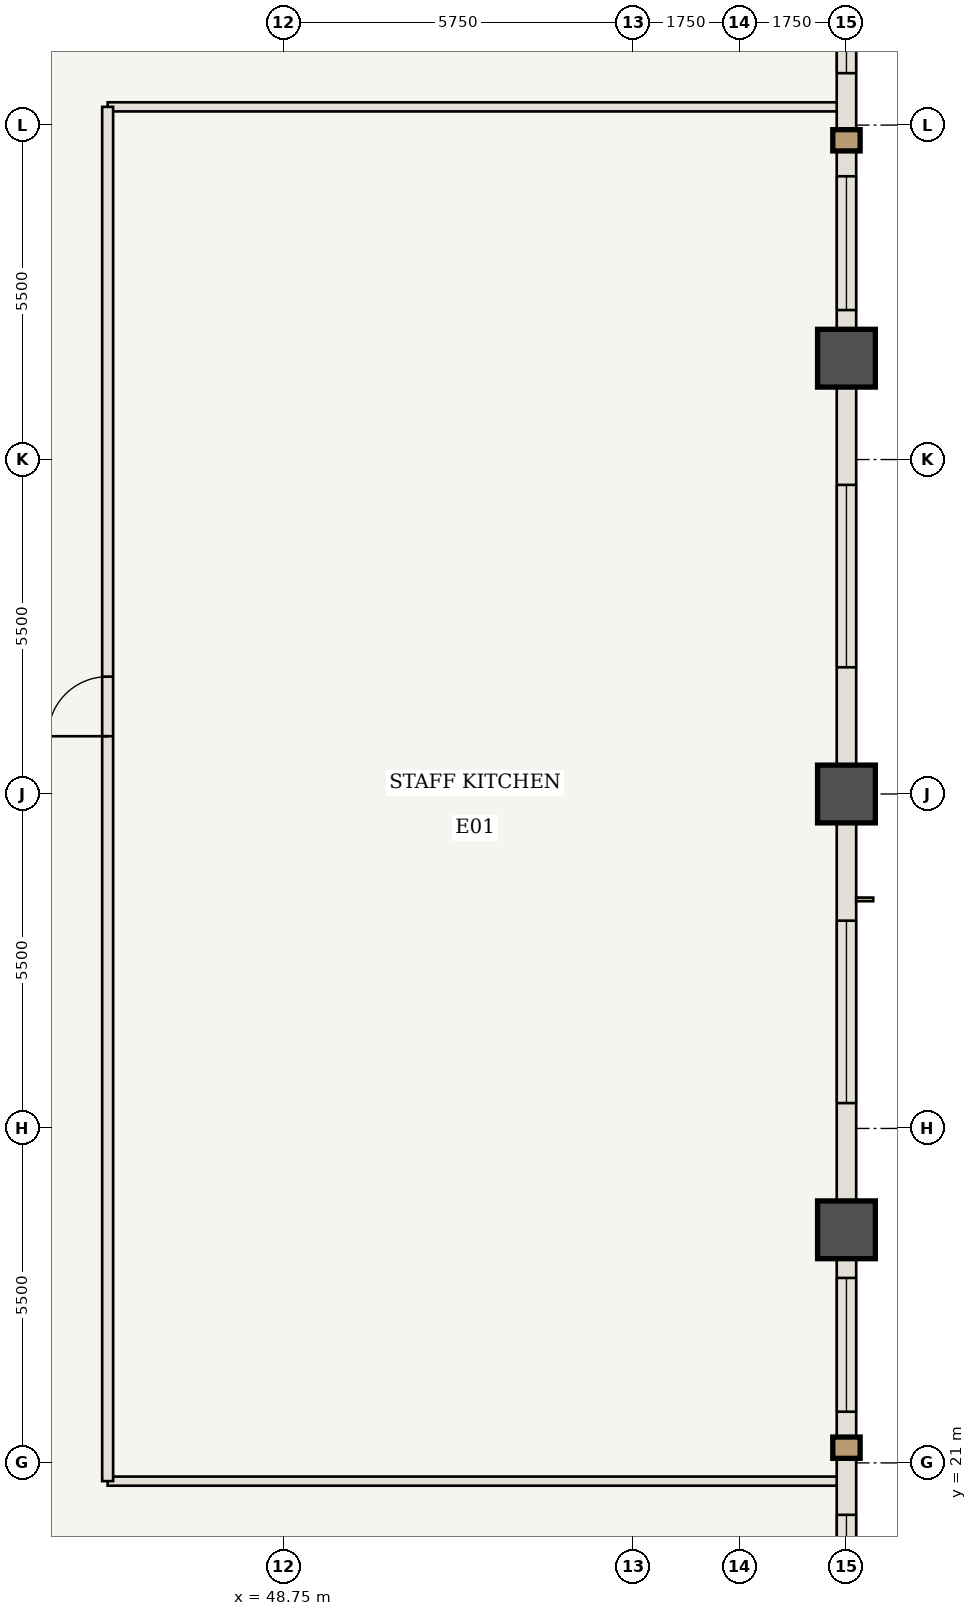
"""IFC4 building model, lengths in metres.
Left out: names, types, materials, properties, quantities, classifications, styles, units other than length and angle.
Written with IfcOpenShell. Run it as: python <this file> out.ifc"""

import sys

from ifc_helpers import new_model, si_unit, direction, frame, frame_2d, origin, origin_2d, place, context, subcontext, project, spatial, rectangle, extrude, element, fill, save


model = new_model("IFC4")
c1 = context("Model", 3, precision=1e-05, world=origin(), true_north=direction((0.0, 1.0)))
c2 = subcontext(c1, "Body", "Model", "MODEL_VIEW")
j1 = project(units=[si_unit("LENGTHUNIT", "METRE"), si_unit("PLANEANGLEUNIT", "RADIAN")], contexts=[c1])
p1 = place(None, origin())
s1 = spatial("IfcSite", under=j1, at=p1, CompositionType="ELEMENT")
p2 = place(p1, origin())
s2 = spatial("IfcBuilding", under=s1, at=p2, CompositionType="ELEMENT")
p3 = place(p2, frame((0.0, 0.0, 172.2)))
s3 = spatial("IfcBuildingStorey", under=s2, at=p3, CompositionType="ELEMENT", Elevation=172.2)
for number, where, z_axis, x_axis in (
    (1, (58.0, 24.833, 0.0), (0.0, 0.0, 1.0), (1.0, 0.0, 0.0)),
    (2, (58.0, 32.0, 0.0), (0.0, 0.0, 1.0), (1.0, 0.0, 0.0)),
    (3, (58.0, 39.167, 0.0), (0.0, 0.0, 1.0), (1.0, 0.0, 0.0)),
):
    element("IfcColumn", number, at=place(p3, frame(where, z_axis=z_axis, x_axis=x_axis)), inside=s3, PredefinedType="COLUMN", context=c2, shape_type="SweptSolid", body=[
        extrude(rectangle(XDim=0.95, YDim=0.95, at=origin_2d()), origin(), (0.0, 0.0, 1.0), 3.85),
    ])
for number, where, z_axis, x_axis in (
    (4, (45.85, 20.7, 0.0), (0.0, 0.0, 1.0), (1.0, 0.0, 0.0)),
    (5, (45.85, 43.3, 0.0), (0.0, 0.0, 1.0), (1.0, 0.0, 0.0)),
):
    element("IfcWall", number, at=place(p3, frame(where, z_axis=z_axis, x_axis=x_axis)), inside=s3, PredefinedType="STANDARD", context=c2, shape_type="SweptSolid", body=[
        extrude(rectangle(XDim=12.09, YDim=0.15, at=frame_2d((6.045, 0.0))), origin(), (0.0, 0.0, 1.0), 2.81),
    ])
p4 = place(p3, frame((45.85, 20.7, 0.0), z_axis=(0.0, 0.0, 1.0), x_axis=(0.0, 1.0, 0.0)))
e6 = element("IfcWall", 6, at=p4, inside=s3, PredefinedType="STANDARD", context=c2, shape_type="SweptSolid", body=[
    extrude(rectangle(XDim=22.6, YDim=0.18, at=frame_2d((11.3, 0.0))), origin(), (0.0, 0.0, 1.0), 3.43),
])
p5 = place(p4, frame((12.25, 0.0, 0.0)))
e7 = element("IfcOpeningElement", 7, at=p5, cuts=e6, PredefinedType="OPENING", context=c2, shape_type="SweptSolid", body=[
    extrude(rectangle(XDim=0.98, YDim=2.2, at=frame_2d((0.49, 1.1))), frame((0.0, 0.1, 0.0), z_axis=(0.0, -1.0, 0.0), x_axis=(1.0, 0.0, 0.0)), (0.0, 0.0, 1.0), 0.2),
])
p6 = place(p3, frame((58.0, 24.833, 0.0), z_axis=(0.0, 0.0, 1.0), x_axis=(0.0, -1.0, 0.0)))
e8 = element("IfcWall", 8, at=p6, inside=s3, PredefinedType="USERDEFINED", context=c2, shape_type="SweptSolid", body=[
    extrude(rectangle(XDim=7.167, YDim=0.32, at=frame_2d((3.583, 0.0))), origin(), (0.0, 0.0, 1.0), 2.63),
])
p7 = place(p6, frame((0.792, 0.0, 0.85)))
e9 = element("IfcOpeningElement", 9, at=p7, cuts=e8, PredefinedType="OPENING", context=c2, shape_type="SweptSolid", body=[
    extrude(rectangle(XDim=2.2, YDim=1.58, at=frame_2d((1.1, 0.79))), frame((0.0, 0.17, 0.0), z_axis=(0.0, -1.0, 0.0), x_axis=(1.0, 0.0, 0.0)), (0.0, 0.0, 1.0), 0.34),
])
p8 = place(p6, frame((4.688, 0.0, 0.85)))
e10 = element("IfcOpeningElement", 10, at=p8, cuts=e8, PredefinedType="OPENING", context=c2, shape_type="SweptSolid", body=[
    extrude(rectangle(XDim=1.6, YDim=1.58, at=frame_2d((0.8, 0.79))), frame((0.0, 0.17, 0.0), z_axis=(0.0, -1.0, 0.0), x_axis=(1.0, 0.0, 0.0)), (0.0, 0.0, 1.0), 0.34),
])
p9 = place(p3, frame((58.0, 32.0, 0.0), z_axis=(0.0, 0.0, 1.0), x_axis=(0.0, -1.0, 0.0)))
e11 = element("IfcWall", 11, at=p9, inside=s3, PredefinedType="USERDEFINED", context=c2, shape_type="SweptSolid", body=[
    extrude(rectangle(XDim=7.167, YDim=0.32, at=frame_2d((3.583, 0.0))), origin(), (0.0, 0.0, 1.0), 2.63),
])
p10 = place(p9, frame((2.083, 0.0, 0.85)))
e12 = element("IfcOpeningElement", 12, at=p10, cuts=e11, PredefinedType="OPENING", context=c2, shape_type="SweptSolid", body=[
    extrude(rectangle(XDim=3.0, YDim=1.58, at=frame_2d((1.5, 0.79))), frame((0.0, 0.17, 0.0), z_axis=(0.0, -1.0, 0.0), x_axis=(1.0, 0.0, 0.0)), (0.0, 0.0, 1.0), 0.34),
])
p11 = place(p3, frame((58.0, 39.167, 0.0), z_axis=(0.0, 0.0, 1.0), x_axis=(0.0, -1.0, 0.0)))
e13 = element("IfcWall", 13, at=p11, inside=s3, PredefinedType="USERDEFINED", context=c2, shape_type="SweptSolid", body=[
    extrude(rectangle(XDim=7.167, YDim=0.32, at=frame_2d((3.583, 0.0))), origin(), (0.0, 0.0, 1.0), 2.63),
])
p12 = place(p11, frame((2.083, 0.0, 0.85)))
e14 = element("IfcOpeningElement", 14, at=p12, cuts=e13, PredefinedType="OPENING", context=c2, shape_type="SweptSolid", body=[
    extrude(rectangle(XDim=3.0, YDim=1.58, at=frame_2d((1.5, 0.79))), frame((0.0, 0.17, 0.0), z_axis=(0.0, -1.0, 0.0), x_axis=(1.0, 0.0, 0.0)), (0.0, 0.0, 1.0), 0.34),
])
p13 = place(p3, frame((58.0, 46.333, 0.0), z_axis=(0.0, 0.0, 1.0), x_axis=(0.0, -1.0, 0.0)))
e15 = element("IfcWall", 15, at=p13, inside=s3, PredefinedType="USERDEFINED", context=c2, shape_type="SweptSolid", body=[
    extrude(rectangle(XDim=7.167, YDim=0.32, at=frame_2d((3.583, 0.0))), origin(), (0.0, 0.0, 1.0), 2.63),
])
p14 = place(p13, frame((0.879, 0.0, 0.85)))
e16 = element("IfcOpeningElement", 16, at=p14, cuts=e15, PredefinedType="OPENING", context=c2, shape_type="SweptSolid", body=[
    extrude(rectangle(XDim=1.6, YDim=1.58, at=frame_2d((0.8, 0.79))), frame((0.0, 0.17, 0.0), z_axis=(0.0, -1.0, 0.0), x_axis=(1.0, 0.0, 0.0)), (0.0, 0.0, 1.0), 0.34),
])
p15 = place(p13, frame((4.175, 0.0, 0.85)))
e17 = element("IfcOpeningElement", 17, at=p15, cuts=e15, PredefinedType="OPENING", context=c2, shape_type="SweptSolid", body=[
    extrude(rectangle(XDim=2.2, YDim=1.58, at=frame_2d((1.1, 0.79))), frame((0.0, 0.17, 0.0), z_axis=(0.0, -1.0, 0.0), x_axis=(1.0, 0.0, 0.0)), (0.0, 0.0, 1.0), 0.34),
])
p16 = place(p5, origin())
e18 = element("IfcDoor", 18, at=p16, inside=s3, OperationType="SINGLE_SWING_LEFT", PredefinedType="DOOR", context=c2, shape_type="SweptSolid", body=[
    extrude(rectangle(XDim=0.98, YDim=2.2, at=frame_2d((0.49, 1.1))), frame((0.0, 0.025, 0.0), z_axis=(0.0, -1.0, 0.0), x_axis=(1.0, 0.0, 0.0)), (0.0, 0.0, 1.0), 0.05),
])
fill(e7, e18)
p17 = place(p7, origin())
e19 = element("IfcWindow", 19, at=p17, inside=s3, PartitioningType="SINGLE_PANEL", PredefinedType="WINDOW", context=c2, shape_type="SweptSolid", body=[
    extrude(rectangle(XDim=2.2, YDim=1.58, at=frame_2d((1.1, 0.79))), frame((0.0, 0.03, 0.0), z_axis=(0.0, -1.0, 0.0), x_axis=(1.0, 0.0, 0.0)), (0.0, 0.0, 1.0), 0.06),
])
fill(e9, e19)
p18 = place(p8, origin())
e20 = element("IfcWindow", 20, at=p18, inside=s3, PartitioningType="SINGLE_PANEL", PredefinedType="WINDOW", context=c2, shape_type="SweptSolid", body=[
    extrude(rectangle(XDim=1.6, YDim=1.58, at=frame_2d((0.8, 0.79))), frame((0.0, 0.03, 0.0), z_axis=(0.0, -1.0, 0.0), x_axis=(1.0, 0.0, 0.0)), (0.0, 0.0, 1.0), 0.06),
])
fill(e10, e20)
p19 = place(p10, origin())
e21 = element("IfcWindow", 21, at=p19, inside=s3, PartitioningType="SINGLE_PANEL", PredefinedType="WINDOW", context=c2, shape_type="SweptSolid", body=[
    extrude(rectangle(XDim=3.0, YDim=1.58, at=frame_2d((1.5, 0.79))), frame((0.0, 0.03, 0.0), z_axis=(0.0, -1.0, 0.0), x_axis=(1.0, 0.0, 0.0)), (0.0, 0.0, 1.0), 0.06),
])
fill(e12, e21)
p20 = place(p12, origin())
e22 = element("IfcWindow", 22, at=p20, inside=s3, PartitioningType="SINGLE_PANEL", PredefinedType="WINDOW", context=c2, shape_type="SweptSolid", body=[
    extrude(rectangle(XDim=3.0, YDim=1.58, at=frame_2d((1.5, 0.79))), frame((0.0, 0.03, 0.0), z_axis=(0.0, -1.0, 0.0), x_axis=(1.0, 0.0, 0.0)), (0.0, 0.0, 1.0), 0.06),
])
fill(e14, e22)
p21 = place(p14, origin())
e23 = element("IfcWindow", 23, at=p21, inside=s3, PartitioningType="SINGLE_PANEL", PredefinedType="WINDOW", context=c2, shape_type="SweptSolid", body=[
    extrude(rectangle(XDim=1.6, YDim=1.58, at=frame_2d((0.8, 0.79))), frame((0.0, 0.03, 0.0), z_axis=(0.0, -1.0, 0.0), x_axis=(1.0, 0.0, 0.0)), (0.0, 0.0, 1.0), 0.06),
])
fill(e16, e23)
p22 = place(p15, origin())
e24 = element("IfcWindow", 24, at=p22, inside=s3, PartitioningType="SINGLE_PANEL", PredefinedType="WINDOW", context=c2, shape_type="SweptSolid", body=[
    extrude(rectangle(XDim=2.2, YDim=1.58, at=frame_2d((1.1, 0.79))), frame((0.0, 0.03, 0.0), z_axis=(0.0, -1.0, 0.0), x_axis=(1.0, 0.0, 0.0)), (0.0, 0.0, 1.0), 0.06),
])
fill(e17, e24)
save(model, sys.argv[1])
